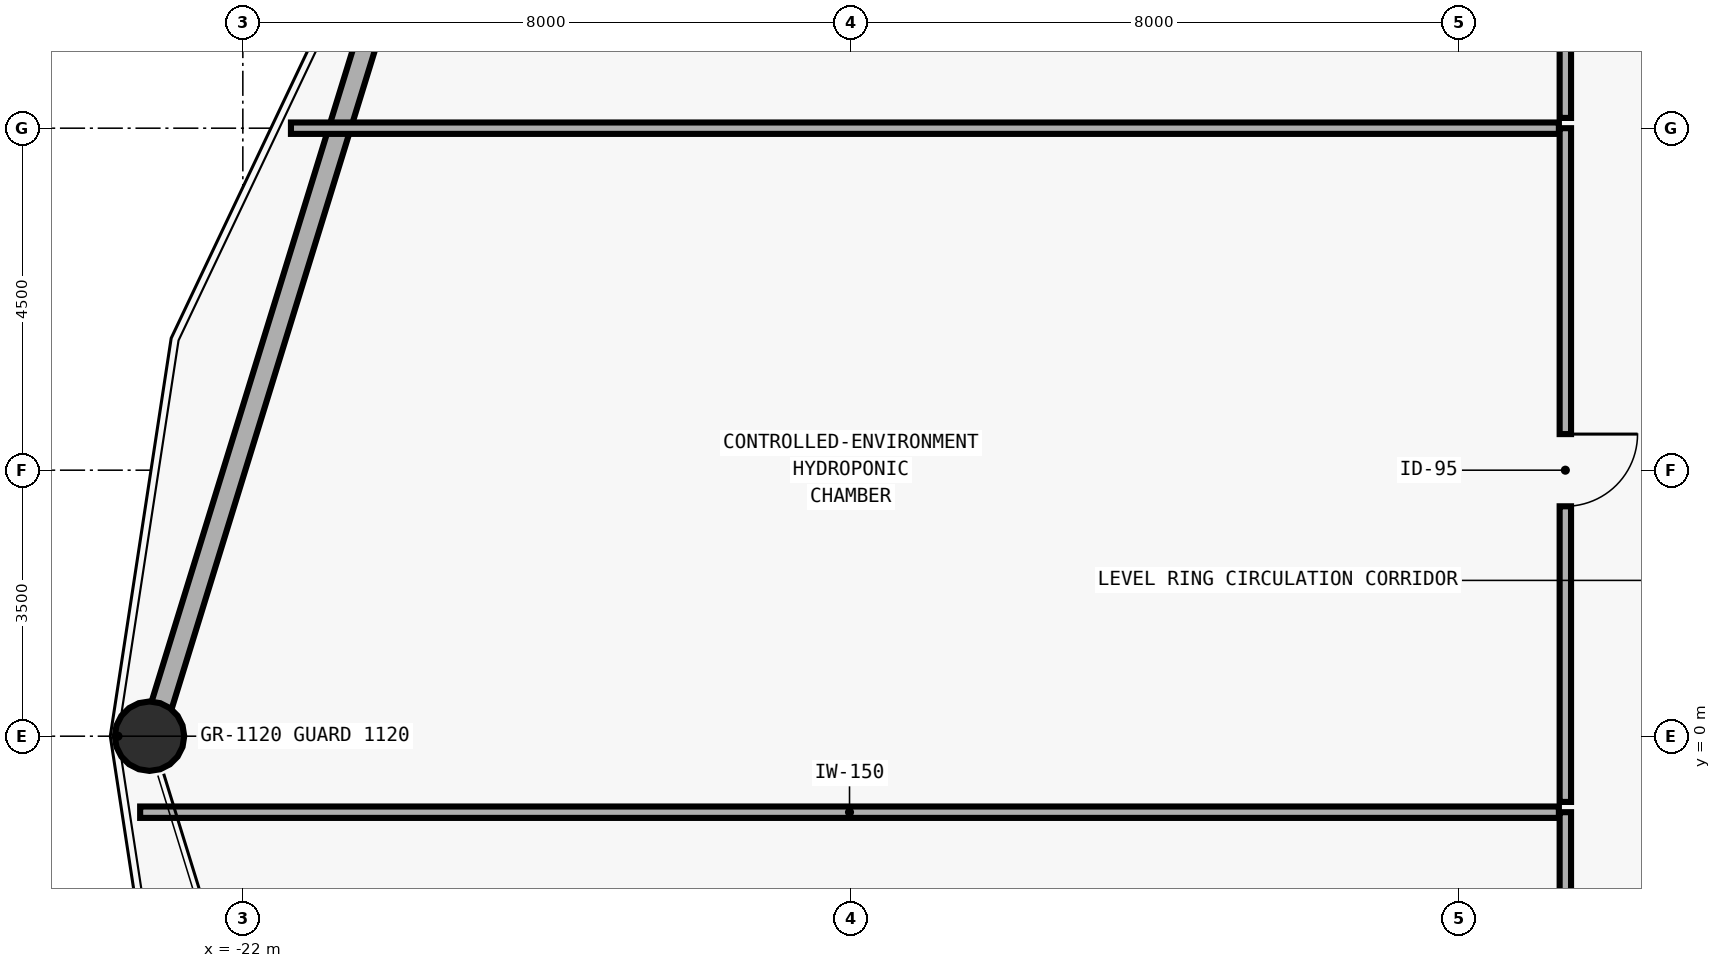
"""IFC4 building model, lengths in metres.
Left out: names, types, materials, properties, quantities, classifications, styles, units other than length and angle.
Written with IfcOpenShell. Run it as: python <this file> out.ifc"""

import sys

from ifc_helpers import new_model, si_unit, direction, frame, frame_2d, origin, origin_2d, place, context, subcontext, project, spatial, rectangle, hollow_circle, extrude, element, fill, save


model = new_model("IFC4")
c1 = context("Model", 3, precision=1e-05, world=origin(), true_north=direction((0.0, 1.0)))
c2 = subcontext(c1, "Body", "Model", "MODEL_VIEW")
j1 = project(units=[si_unit("LENGTHUNIT", "METRE"), si_unit("PLANEANGLEUNIT", "RADIAN")], contexts=[c1])
p1 = place(None, origin())
s1 = spatial("IfcSite", under=j1, at=p1, CompositionType="ELEMENT")
p2 = place(p1, origin())
s2 = spatial("IfcBuilding", under=s1, at=p2, CompositionType="ELEMENT")
p3 = place(p2, frame((0.0, 0.0, 70.5)))
s3 = spatial("IfcBuildingStorey", under=s2, at=p3, CompositionType="ELEMENT", Elevation=70.5)
p4 = place(p3, frame((-23.194, 0.0, 0.0), z_axis=(-0.017512434946, 0.0, 0.999846645552), x_axis=(0.0, -1.0, 0.0)))
e1 = element("IfcColumn", 1, at=p4, inside=s3, PredefinedType="COLUMN", context=c2, shape_type="SweptSolid", body=[
    extrude(hollow_circle(Radius=0.457, WallThickness=0.032, at=origin_2d()), origin(), (0.0, 0.0, 1.0), 3.875),
])
p5 = place(p3, frame((-23.073, 0.394, 0.0), z_axis=(0.0, 0.0, 1.0), x_axis=(0.294895424551, 0.955529533075, 0.0)))
e2 = element("IfcWall", 2, at=p5, inside=s3, PredefinedType="SOLIDWALL", context=c2, shape_type="SweptSolid", body=[
    extrude(rectangle(XDim=9.429, YDim=0.28, at=frame_2d((4.714, 0.0))), origin(), (0.0, 0.0, 1.0), 3.06),
])
p6 = place(p3, frame((-4.6, -1.0, 0.0), z_axis=(0.0, 0.0, 1.0), x_axis=(0.0, -1.0, 0.0)))
e3 = element("IfcWall", 3, at=p6, inside=s3, PredefinedType="PARTITIONING", context=c2, shape_type="SweptSolid", body=[
    extrude(rectangle(XDim=5.6, YDim=0.15, at=frame_2d((2.8, 0.0))), origin(), (0.0, 0.0, 1.0), 3.64),
])
p7 = place(p6, frame((2.325, 0.0, 0.0)))
e4 = element("IfcOpeningElement", 4, at=p7, cuts=e3, PredefinedType="OPENING", context=c2, shape_type="SweptSolid", body=[
    extrude(rectangle(XDim=0.95, YDim=2.1, at=frame_2d((0.475, 1.05))), frame((0.0, 0.085, 0.0), z_axis=(0.0, -1.0, 0.0), x_axis=(1.0, 0.0, 0.0)), (0.0, 0.0, 1.0), 0.17),
])
p8 = place(p3, frame((-4.6, 8.0, 0.0), z_axis=(0.0, 0.0, 1.0), x_axis=(0.0, -1.0, 0.0)))
e5 = element("IfcWall", 5, at=p8, inside=s3, PredefinedType="PARTITIONING", context=c2, shape_type="SweptSolid", body=[
    extrude(rectangle(XDim=8.865, YDim=0.15, at=frame_2d((4.433, 0.0))), origin(), (0.0, 0.0, 1.0), 3.64),
])
p9 = place(p8, frame((4.025, 0.0, 0.0)))
e6 = element("IfcOpeningElement", 6, at=p9, cuts=e5, PredefinedType="OPENING", context=c2, shape_type="SweptSolid", body=[
    extrude(rectangle(XDim=0.95, YDim=2.1, at=frame_2d((0.475, 1.05))), frame((0.0, 0.085, 0.0), z_axis=(0.0, -1.0, 0.0), x_axis=(1.0, 0.0, 0.0)), (0.0, 0.0, 1.0), 0.17),
])
p10 = place(p3, frame((-4.6, 12.5, 0.0), z_axis=(0.0, 0.0, 1.0), x_axis=(0.0, -1.0, 0.0)))
e7 = element("IfcWall", 7, at=p10, inside=s3, PredefinedType="PARTITIONING", context=c2, shape_type="SweptSolid", body=[
    extrude(rectangle(XDim=4.365, YDim=0.15, at=frame_2d((2.183, 0.0))), origin(), (0.0, 0.0, 1.0), 3.64),
])
p11 = place(p10, frame((1.775, 0.0, 0.0)))
e8 = element("IfcOpeningElement", 8, at=p11, cuts=e7, PredefinedType="OPENING", context=c2, shape_type="SweptSolid", body=[
    extrude(rectangle(XDim=0.95, YDim=2.1, at=frame_2d((0.475, 1.05))), frame((0.0, 0.085, 0.0), z_axis=(0.0, -1.0, 0.0), x_axis=(1.0, 0.0, 0.0)), (0.0, 0.0, 1.0), 0.17),
])
p12 = place(p3, frame((-23.351, -1.0, 0.0), z_axis=(0.0, 0.0, 1.0), x_axis=(1.0, 0.0, 0.0)))
e9 = element("IfcWall", 9, at=p12, inside=s3, PredefinedType="PARTITIONING", context=c2, shape_type="SweptSolid", body=[
    extrude(rectangle(XDim=18.666, YDim=0.15, at=frame_2d((9.333, 0.0))), origin(), (0.0, 0.0, 1.0), 3.64),
])
p13 = place(p3, frame((-21.367, 8.0, 0.0), z_axis=(0.0, 0.0, 1.0), x_axis=(1.0, 0.0, 0.0)))
e10 = element("IfcWall", 10, at=p13, inside=s3, PredefinedType="PARTITIONING", context=c2, shape_type="SweptSolid", body=[
    extrude(rectangle(XDim=16.682, YDim=0.15, at=frame_2d((8.341, 0.0))), origin(), (0.0, 0.0, 1.0), 3.64),
])
p14 = place(p9, origin())
e11 = element("IfcDoor", 11, at=p14, inside=s3, OperationType="SINGLE_SWING_LEFT", PredefinedType="DOOR", context=c2, shape_type="SweptSolid", body=[
    extrude(rectangle(XDim=0.95, YDim=2.1, at=frame_2d((0.475, 1.05))), frame((0.0, 0.025, 0.0), z_axis=(0.0, -1.0, 0.0), x_axis=(1.0, 0.0, 0.0)), (0.0, 0.0, 1.0), 0.05),
])
fill(e6, e11)
save(model, sys.argv[1])
